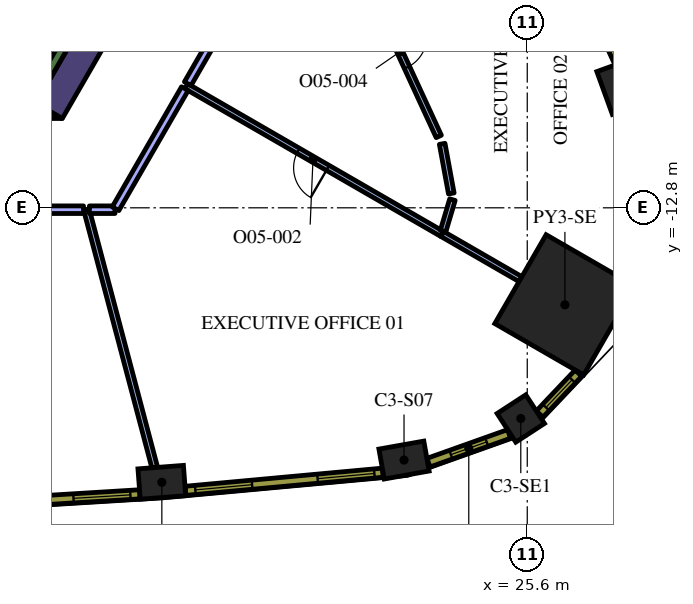
"""IFC4 building model, lengths in metres.
Left out: names, types, materials, properties, quantities, classifications, styles, units other than length and angle.
Written with IfcOpenShell. Run it as: python <this file> out.ifc"""

import sys

from ifc_helpers import new_model, si_unit, direction, frame, frame_2d, origin, origin_2d, place, context, subcontext, project, spatial, polyline, rectangle, outline, extrude, element, fill, save


model = new_model("IFC4")
c1 = context("Model", 3, precision=1e-05, world=origin(), true_north=direction((0.0, 1.0)))
c2 = subcontext(c1, "Body", "Model", "MODEL_VIEW")
j1 = project(units=[si_unit("LENGTHUNIT", "METRE"), si_unit("PLANEANGLEUNIT", "RADIAN")], contexts=[c1])
p1 = place(None, origin())
s1 = spatial("IfcSite", under=j1, at=p1, CompositionType="ELEMENT")
p2 = place(p1, origin())
s2 = spatial("IfcBuilding", under=s1, at=p2, CompositionType="ELEMENT")
p3 = place(p2, frame((0.0, 0.0, 192.0)))
s3 = spatial("IfcBuildingStorey", under=s2, at=p3, CompositionType="ELEMENT", Elevation=192.0)
p4 = place(p3, frame((26.591, -15.352, 0.0), z_axis=(0.0, 0.0, 1.0), x_axis=(0.866025403784, -0.5, 0.0)))
e1 = element("IfcColumn", 1, at=p4, inside=s3, PredefinedType="COLUMN", context=c2, shape_type="SweptSolid", body=[
    extrude(rectangle(XDim=2.7, YDim=2.7, at=origin_2d()), origin(), (0.0, 0.0, 1.0), 4.2),
])
for number, where, z_axis, x_axis in (
    (2, (15.985, -20.022, 0.0), (0.0, 0.0, 1.0), (0.997, 0.076, 0.0)),
    (3, (22.357, -19.437, 0.0), (0.0, 0.0, 1.0), (0.985, 0.175, 0.0)),
):
    element("IfcColumn", number, at=place(p3, frame(where, z_axis=z_axis, x_axis=x_axis)), inside=s3, PredefinedType="COLUMN", context=c2, shape_type="SweptSolid", body=[
        extrude(rectangle(XDim=1.2, YDim=0.8, at=origin_2d()), origin(), (0.0, 0.0, 1.0), 4.2),
    ])
p5 = place(p3, frame((25.43, -18.344, 0.0), z_axis=(0.0, 0.0, 1.0), x_axis=(0.838094050847, 0.545525766518, 0.0)))
e4 = element("IfcColumn", 4, at=p5, inside=s3, PredefinedType="COLUMN", context=c2, shape_type="SweptSolid", body=[
    extrude(rectangle(XDim=0.9, YDim=0.9, at=origin_2d()), origin(), (0.0, 0.0, 1.0), 4.2),
])
p6 = place(p3, frame((28.012, -9.644, 0.0), z_axis=(0.0, 0.0, 1.0), x_axis=(-0.340743851601, 0.940156171918, 0.0)))
e5 = element("IfcColumn", 5, at=p6, inside=s3, PredefinedType="COLUMN", context=c2, shape_type="SweptSolid", body=[
    extrude(rectangle(XDim=1.2, YDim=0.8, at=origin_2d()), origin(), (0.0, 0.0, 1.0), 4.2),
])
p7 = place(p3, frame((13.018, -10.252, 0.0), z_axis=(0.0, 0.0, 1.0), x_axis=(0.499984020225, 0.866034629516, 0.0)))
e6 = element("IfcWall", 6, at=p7, inside=s3, PredefinedType="SOLIDWALL", context=c2, shape_type="SweptSolid", body=[
    extrude(rectangle(XDim=3.824, YDim=0.8, at=frame_2d((1.912, 0.0))), origin(), (0.0, 0.0, 1.0), 4.2),
])
p8 = place(p3, origin())
e7 = element("IfcWall", 7, at=p8, inside=s3, PredefinedType="SOLIDWALL", context=c2, shape_type="SweptSolid", body=[
    extrude(outline(polyline([(12.442, -10.45), (12.671, -10.053), (13.358, -10.45), (12.442, -10.45)])), origin(), (0.0, 0.0, 1.0), 4.2),
])
p9 = place(p3, frame((12.84, -9.511, 0.0), z_axis=(0.0, 0.0, 1.0), x_axis=(0.499997733992, 0.866026712061, 0.0)))
e8 = element("IfcWall", 8, at=p9, inside=s3, PredefinedType="SOLIDWALL", context=c2, shape_type="SweptSolid", body=[
    extrude(rectangle(XDim=3.634, YDim=0.25, at=frame_2d((1.817, 0.0))), origin(), (0.0, 0.0, 1.0), 4.2),
])
p10 = place(p3, frame((14.001, -12.85, 0.0), z_axis=(0.0, 0.0, 1.0), x_axis=(0.255926020624, -0.966696370102, 0.0)))
e9 = element("IfcWall", 9, at=p10, inside=s3, PredefinedType="PARTITIONING", context=c2, shape_type="SweptSolid", body=[
    extrude(rectangle(XDim=7.019, YDim=0.15, at=frame_2d((3.51, 0.0))), origin(), (0.0, 0.0, 1.0), 3.1),
])
p11 = place(p3, frame((6.03, -12.85, 0.0), z_axis=(0.0, 0.0, 1.0), x_axis=(1.0, 0.0, 0.0)))
e10 = element("IfcWall", 10, at=p11, inside=s3, PredefinedType="PARTITIONING", context=c2, shape_type="SweptSolid", body=[
    extrude(rectangle(XDim=7.894, YDim=0.2, at=frame_2d((3.947, 0.0))), origin(), (0.0, 0.0, 1.0), 3.1),
])
p12 = place(p3, frame((23.36, -13.487, 0.0), z_axis=(0.0, 0.0, 1.0), x_axis=(0.866013104554, -0.500021302286, 0.0)))
e11 = element("IfcWall", 11, at=p12, inside=s3, PredefinedType="PARTITIONING", context=c2, shape_type="SweptSolid", body=[
    extrude(rectangle(XDim=2.381, YDim=0.15, at=frame_2d((1.19, 0.0))), origin(), (0.0, 0.0, 1.0), 3.1),
])
p13 = place(p3, frame((23.366, -13.491, 0.0), z_axis=(0.0, 0.0, 1.0), x_axis=(-0.866025704444, 0.499999479242, 0.0)))
e12 = element("IfcWall", 12, at=p13, inside=s3, PredefinedType="PARTITIONING", context=c2, shape_type="SweptSolid", body=[
    extrude(rectangle(XDim=7.781, YDim=0.15, at=frame_2d((3.891, 0.0))), origin(), (0.0, 0.0, 1.0), 3.1),
])
p14 = place(p13, frame((3.481, 0.0, 0.0)))
e13 = element("IfcOpeningElement", 13, at=p14, cuts=e12, PredefinedType="OPENING", context=c2, shape_type="SweptSolid", body=[
    extrude(rectangle(XDim=0.9, YDim=2.1, at=frame_2d((0.45, 1.05))), frame((0.0, 0.085, 0.0), z_axis=(0.0, -1.0, 0.0), x_axis=(1.0, 0.0, 0.0)), (0.0, 0.0, 1.0), 0.17),
])
p15 = place(p3, frame((14.079, -12.85, 0.0), z_axis=(0.0, 0.0, 1.0), x_axis=(1.0, 0.0, 0.0)))
e14 = element("IfcWall", 14, at=p15, inside=s3, PredefinedType="PARTITIONING", context=c2, shape_type="SweptSolid", body=[
    extrude(rectangle(XDim=0.673, YDim=0.2, at=frame_2d((0.336, 0.0))), origin(), (0.0, 0.0, 1.0), 3.1),
])
p16 = place(p3, frame((14.766, -12.824, 0.0), z_axis=(0.0, 0.0, 1.0), x_axis=(0.499983176524, 0.866035116605, 0.0)))
e15 = element("IfcWall", 15, at=p16, inside=s3, PredefinedType="PARTITIONING", context=c2, shape_type="SweptSolid", body=[
    extrude(rectangle(XDim=3.648, YDim=0.2, at=frame_2d((1.824, 0.0))), origin(), (0.0, 0.0, 1.0), 3.1),
])
p17 = place(p3, frame((23.385, -13.415, 0.0), z_axis=(0.0, 0.0, 1.0), x_axis=(0.28439571453, 0.958706982116, 0.0)))
e16 = element("IfcWall", 16, at=p17, inside=s3, PredefinedType="PARTITIONING", context=c2, shape_type="SweptSolid", body=[
    extrude(rectangle(XDim=0.865, YDim=0.15, at=frame_2d((0.433, 0.0))), origin(), (0.0, 0.0, 1.0), 3.1),
])
p18 = place(p3, frame((23.601, -12.422, 0.0), z_axis=(0.0, 0.0, 1.0), x_axis=(-0.180633363018, 0.983550501075, 0.0)))
e17 = element("IfcWall", 17, at=p18, inside=s3, PredefinedType="PARTITIONING", context=c2, shape_type="SweptSolid", body=[
    extrude(rectangle(XDim=1.327, YDim=0.15, at=frame_2d((0.664, 0.0))), origin(), (0.0, 0.0, 1.0), 3.1),
])
p19 = place(p3, frame((21.248, -6.533, 0.0), z_axis=(0.0, 0.0, 1.0), x_axis=(0.418705826438, -0.908121925133, 0.0)))
e18 = element("IfcWall", 18, at=p19, inside=s3, PredefinedType="PARTITIONING", context=c2, shape_type="SweptSolid", body=[
    extrude(rectangle(XDim=4.834, YDim=0.15, at=frame_2d((2.417, 0.0))), origin(), (0.0, 0.0, 1.0), 3.1),
])
p20 = place(p19, frame((1.934, 0.0, 0.0)))
e19 = element("IfcOpeningElement", 19, at=p20, cuts=e18, PredefinedType="OPENING", context=c2, shape_type="SweptSolid", body=[
    extrude(rectangle(XDim=0.9, YDim=2.1, at=frame_2d((0.45, 1.05))), frame((0.0, 0.085, 0.0), z_axis=(0.0, -1.0, 0.0), x_axis=(1.0, 0.0, 0.0)), (0.0, 0.0, 1.0), 0.17),
])
p21 = place(p3, frame((16.665, -9.535, 0.0), z_axis=(0.0, 0.0, 1.0), x_axis=(0.499994443168, 0.866028611999, 0.0)))
e20 = element("IfcWall", 20, at=p21, inside=s3, PredefinedType="PARTITIONING", context=c2, shape_type="SweptSolid", body=[
    extrude(rectangle(XDim=3.678, YDim=0.2, at=frame_2d((1.839, 0.0))), origin(), (0.0, 0.0, 1.0), 3.1),
])
p22 = place(p3, frame((10.211, -20.656, 0.0), z_axis=(0.0, 0.0, 1.0), x_axis=(0.998135294646, 0.061040425794, 0.0)))
e21 = element("IfcWall", 21, at=p22, inside=s3, PredefinedType="SOLIDWALL", context=c2, shape_type="SweptSolid", body=[
    extrude(rectangle(XDim=5.204, YDim=0.24, at=frame_2d((2.602, 0.0))), origin(), (0.0, 0.0, 1.0), 3.9),
])
p23 = place(p22, frame((0.248, 0.0, 0.9)))
e22 = element("IfcOpeningElement", 22, at=p23, cuts=e21, PredefinedType="OPENING", context=c2, shape_type="SweptSolid", body=[
    extrude(rectangle(XDim=1.5, YDim=2.55, at=frame_2d((0.75, 1.275))), frame((0.0, 0.13, 0.0), z_axis=(0.0, -1.0, 0.0), x_axis=(1.0, 0.0, 0.0)), (0.0, 0.0, 1.0), 0.26),
])
p24 = place(p22, frame((3.455, 0.0, 0.9)))
e23 = element("IfcOpeningElement", 23, at=p24, cuts=e21, PredefinedType="OPENING", context=c2, shape_type="SweptSolid", body=[
    extrude(rectangle(XDim=1.5, YDim=2.55, at=frame_2d((0.75, 1.275))), frame((0.0, 0.13, 0.0), z_axis=(0.0, -1.0, 0.0), x_axis=(1.0, 0.0, 0.0)), (0.0, 0.0, 1.0), 0.26),
])
p25 = place(p3, frame((16.606, -20.247, 0.0), z_axis=(0.0, 0.0, 1.0), x_axis=(0.995808712151, 0.091460422067, 0.0)))
e24 = element("IfcWall", 24, at=p25, inside=s3, PredefinedType="SOLIDWALL", context=c2, shape_type="SweptSolid", body=[
    extrude(rectangle(XDim=5.213, YDim=0.24, at=frame_2d((2.606, 0.0))), origin(), (0.0, 0.0, 1.0), 3.9),
])
p26 = place(p25, frame((0.261, 0.0, 0.9)))
e25 = element("IfcOpeningElement", 25, at=p26, cuts=e24, PredefinedType="OPENING", context=c2, shape_type="SweptSolid", body=[
    extrude(rectangle(XDim=1.5, YDim=2.55, at=frame_2d((0.75, 1.275))), frame((0.0, 0.13, 0.0), z_axis=(0.0, -1.0, 0.0), x_axis=(1.0, 0.0, 0.0)), (0.0, 0.0, 1.0), 0.26),
])
p27 = place(p25, frame((3.492, 0.0, 0.9)))
e26 = element("IfcOpeningElement", 26, at=p27, cuts=e24, PredefinedType="OPENING", context=c2, shape_type="SweptSolid", body=[
    extrude(rectangle(XDim=1.5, YDim=2.55, at=frame_2d((0.75, 1.275))), frame((0.0, 0.13, 0.0), z_axis=(0.0, -1.0, 0.0), x_axis=(1.0, 0.0, 0.0)), (0.0, 0.0, 1.0), 0.26),
])
p28 = place(p3, frame((23.001, -19.505, 0.0), z_axis=(0.0, 0.0, 1.0), x_axis=(0.942099727267, 0.335332825539, 0.0)))
e27 = element("IfcWall", 27, at=p28, inside=s3, PredefinedType="SOLIDWALL", context=c2, shape_type="SweptSolid", body=[
    extrude(rectangle(XDim=2.25, YDim=0.24, at=frame_2d((1.125, 0.0))), origin(), (0.0, 0.0, 1.0), 3.9),
])
p29 = place(p28, frame((0.625, 0.0, 0.9)))
e28 = element("IfcOpeningElement", 28, at=p29, cuts=e27, PredefinedType="OPENING", context=c2, shape_type="SweptSolid", body=[
    extrude(rectangle(XDim=1.0, YDim=2.55, at=frame_2d((0.5, 1.275))), frame((0.0, 0.13, 0.0), z_axis=(0.0, -1.0, 0.0), x_axis=(1.0, 0.0, 0.0)), (0.0, 0.0, 1.0), 0.26),
])
p30 = place(p3, frame((25.927, -18.226, 0.0), z_axis=(0.0, 0.0, 1.0), x_axis=(0.687986858937, 0.725723144133, 0.0)))
e29 = element("IfcWall", 29, at=p30, inside=s3, PredefinedType="SOLIDWALL", context=c2, shape_type="SweptSolid", body=[
    extrude(rectangle(XDim=1.481, YDim=0.24, at=frame_2d((0.741, 0.0))), origin(), (0.0, 0.0, 1.0), 3.9),
])
p31 = place(p30, frame((0.241, 0.0, 0.9)))
e30 = element("IfcOpeningElement", 30, at=p31, cuts=e29, PredefinedType="OPENING", context=c2, shape_type="SweptSolid", body=[
    extrude(rectangle(XDim=1.0, YDim=2.55, at=frame_2d((0.5, 1.275))), frame((0.0, 0.13, 0.0), z_axis=(0.0, -1.0, 0.0), x_axis=(1.0, 0.0, 0.0)), (0.0, 0.0, 1.0), 0.26),
])
p32 = place(p3, frame((28.02, -8.992, 0.0), z_axis=(0.0, 0.0, 1.0), x_axis=(-0.418722559465, 0.908114209885, 0.0)))
e31 = element("IfcWall", 31, at=p32, inside=s3, PredefinedType="SOLIDWALL", context=c2, shape_type="SweptSolid", body=[
    extrude(rectangle(XDim=5.213, YDim=0.24, at=frame_2d((2.606, 0.0))), origin(), (0.0, 0.0, 1.0), 3.9),
])
p33 = place(p32, frame((0.221, 0.0, 0.9)))
e32 = element("IfcOpeningElement", 32, at=p33, cuts=e31, PredefinedType="OPENING", context=c2, shape_type="SweptSolid", body=[
    extrude(rectangle(XDim=1.5, YDim=2.55, at=frame_2d((0.75, 1.275))), frame((0.0, 0.13, 0.0), z_axis=(0.0, -1.0, 0.0), x_axis=(1.0, 0.0, 0.0)), (0.0, 0.0, 1.0), 0.26),
])
p34 = place(p32, frame((3.452, 0.0, 0.9)))
e33 = element("IfcOpeningElement", 33, at=p34, cuts=e31, PredefinedType="OPENING", context=c2, shape_type="SweptSolid", body=[
    extrude(rectangle(XDim=1.5, YDim=2.55, at=frame_2d((0.75, 1.275))), frame((0.0, 0.13, 0.0), z_axis=(0.0, -1.0, 0.0), x_axis=(1.0, 0.0, 0.0)), (0.0, 0.0, 1.0), 0.26),
])
p35 = place(p14, origin())
e34 = element("IfcDoor", 34, at=p35, inside=s3, OperationType="SINGLE_SWING_RIGHT", PredefinedType="DOOR", context=c2, shape_type="SweptSolid", body=[
    extrude(rectangle(XDim=0.9, YDim=2.1, at=frame_2d((0.45, 1.05))), frame((0.0, 0.025, 0.0), z_axis=(0.0, -1.0, 0.0), x_axis=(1.0, 0.0, 0.0)), (0.0, 0.0, 1.0), 0.05),
])
fill(e13, e34)
p36 = place(p20, origin())
e35 = element("IfcDoor", 35, at=p36, inside=s3, OperationType="SINGLE_SWING_LEFT", PredefinedType="DOOR", context=c2, shape_type="SweptSolid", body=[
    extrude(rectangle(XDim=0.9, YDim=2.1, at=frame_2d((0.45, 1.05))), frame((0.0, 0.025, 0.0), z_axis=(0.0, -1.0, 0.0), x_axis=(1.0, 0.0, 0.0)), (0.0, 0.0, 1.0), 0.05),
])
fill(e19, e35)
p37 = place(p24, origin())
e36 = element("IfcWindow", 36, at=p37, inside=s3, PartitioningType="SINGLE_PANEL", PredefinedType="WINDOW", context=c2, shape_type="SweptSolid", body=[
    extrude(rectangle(XDim=1.5, YDim=2.55, at=frame_2d((0.75, 1.275))), frame((0.0, 0.04, 0.0), z_axis=(0.0, -1.0, 0.0), x_axis=(1.0, 0.0, 0.0)), (0.0, 0.0, 1.0), 0.06),
])
fill(e23, e36)
p38 = place(p26, origin())
e37 = element("IfcWindow", 37, at=p38, inside=s3, PartitioningType="SINGLE_PANEL", PredefinedType="WINDOW", context=c2, shape_type="SweptSolid", body=[
    extrude(rectangle(XDim=1.5, YDim=2.55, at=frame_2d((0.75, 1.275))), frame((0.0, 0.04, 0.0), z_axis=(0.0, -1.0, 0.0), x_axis=(1.0, 0.0, 0.0)), (0.0, 0.0, 1.0), 0.06),
])
fill(e25, e37)
p39 = place(p27, origin())
e38 = element("IfcWindow", 38, at=p39, inside=s3, PartitioningType="SINGLE_PANEL", PredefinedType="WINDOW", context=c2, shape_type="SweptSolid", body=[
    extrude(rectangle(XDim=1.5, YDim=2.55, at=frame_2d((0.75, 1.275))), frame((0.0, 0.04, 0.0), z_axis=(0.0, -1.0, 0.0), x_axis=(1.0, 0.0, 0.0)), (0.0, 0.0, 1.0), 0.06),
])
fill(e26, e38)
p40 = place(p29, origin())
e39 = element("IfcWindow", 39, at=p40, inside=s3, PartitioningType="SINGLE_PANEL", PredefinedType="WINDOW", context=c2, shape_type="SweptSolid", body=[
    extrude(rectangle(XDim=1.0, YDim=2.55, at=frame_2d((0.5, 1.275))), frame((0.0, 0.04, 0.0), z_axis=(0.0, -1.0, 0.0), x_axis=(1.0, 0.0, 0.0)), (0.0, 0.0, 1.0), 0.06),
])
fill(e28, e39)
p41 = place(p31, origin())
e40 = element("IfcWindow", 40, at=p41, inside=s3, PartitioningType="SINGLE_PANEL", PredefinedType="WINDOW", context=c2, shape_type="SweptSolid", body=[
    extrude(rectangle(XDim=1.0, YDim=2.55, at=frame_2d((0.5, 1.275))), frame((0.0, 0.04, 0.0), z_axis=(0.0, -1.0, 0.0), x_axis=(1.0, 0.0, 0.0)), (0.0, 0.0, 1.0), 0.06),
])
fill(e30, e40)
p42 = place(p33, origin())
e41 = element("IfcWindow", 41, at=p42, inside=s3, PartitioningType="SINGLE_PANEL", PredefinedType="WINDOW", context=c2, shape_type="SweptSolid", body=[
    extrude(rectangle(XDim=1.5, YDim=2.55, at=frame_2d((0.75, 1.275))), frame((0.0, 0.04, 0.0), z_axis=(0.0, -1.0, 0.0), x_axis=(1.0, 0.0, 0.0)), (0.0, 0.0, 1.0), 0.06),
])
fill(e32, e41)
save(model, sys.argv[1])
